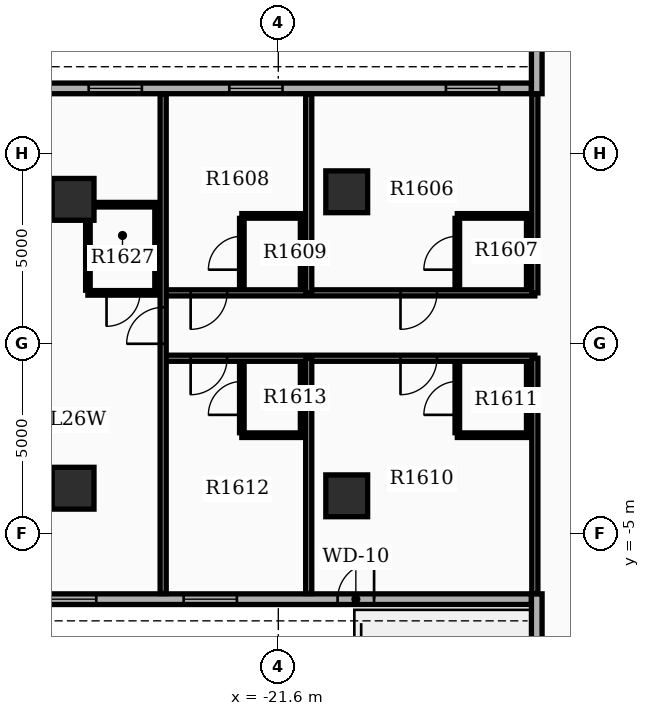
"""IFC4 building model, lengths in metres.
Left out: names, types, materials, properties, quantities, classifications, styles, units other than length and angle.
Written with IfcOpenShell. Run it as: python <this file> out.ifc"""

import sys

from ifc_helpers import new_model, si_unit, direction, frame, frame_2d, origin, origin_2d, place, context, subcontext, project, spatial, rectangle, extrude, element, fill, save


model = new_model("IFC4")
c1 = context("Model", 3, precision=1e-05, world=origin(), true_north=direction((0.0, 1.0)))
c2 = subcontext(c1, "Body", "Model", "MODEL_VIEW")
j1 = project(units=[si_unit("LENGTHUNIT", "METRE"), si_unit("PLANEANGLEUNIT", "RADIAN")], contexts=[c1])
p1 = place(None, origin())
s1 = spatial("IfcSite", under=j1, at=p1, CompositionType="ELEMENT")
p2 = place(p1, origin())
s2 = spatial("IfcBuilding", under=s1, at=p2, CompositionType="ELEMENT")
p3 = place(p2, frame((0.0, 0.0, 104.7)))
s3 = spatial("IfcBuildingStorey", under=s2, at=p3, CompositionType="ELEMENT", Elevation=104.7)
for number, where, z_axis, x_axis in (
    (1, (-19.8, -4.0, 0.0), (0.0, 0.0, 1.0), (1.0, 0.0, 0.0)),
    (2, (-19.8, 4.0, 0.0), (0.0, 0.0, 1.0), (1.0, 0.0, 0.0)),
    (3, (-27.0, -3.8, 0.0), (0.0, 0.0, 1.0), (1.0, 0.0, 0.0)),
    (4, (-27.0, 3.8, 0.0), (0.0, 0.0, 1.0), (1.0, 0.0, 0.0)),
):
    element("IfcColumn", number, at=place(p3, frame(where, z_axis=z_axis, x_axis=x_axis)), inside=s3, PredefinedType="COLUMN", context=c2, shape_type="SweptSolid", body=[
        extrude(rectangle(XDim=1.1, YDim=1.1, at=origin_2d()), origin(), (0.0, 0.0, 1.0), 3.9),
    ])
p4 = place(p3, frame((-14.94, 6.72, 0.0), z_axis=(0.0, 0.0, 1.0), x_axis=(-1.0, 0.0, 0.0)))
e5 = element("IfcWall", 5, at=p4, inside=s3, PredefinedType="STANDARD", context=c2, shape_type="SweptSolid", body=[
    extrude(rectangle(XDim=20.1, YDim=0.28, at=frame_2d((10.05, 0.0))), origin(), (0.0, 0.0, 1.0), 2.97),
])
p5 = place(p4, frame((0.85, 0.0, 0.8)))
e6 = element("IfcOpeningElement", 6, at=p5, cuts=e5, PredefinedType="OPENING", context=c2, shape_type="SweptSolid", body=[
    extrude(rectangle(XDim=1.4, YDim=1.6, at=frame_2d((0.7, 0.8))), frame((0.0, 0.15, 0.0), z_axis=(0.0, -1.0, 0.0), x_axis=(1.0, 0.0, 0.0)), (0.0, 0.0, 1.0), 0.3),
])
p6 = place(p4, frame((6.55, 0.0, 0.8)))
e7 = element("IfcOpeningElement", 7, at=p6, cuts=e5, PredefinedType="OPENING", context=c2, shape_type="SweptSolid", body=[
    extrude(rectangle(XDim=1.4, YDim=1.6, at=frame_2d((0.7, 0.8))), frame((0.0, 0.15, 0.0), z_axis=(0.0, -1.0, 0.0), x_axis=(1.0, 0.0, 0.0)), (0.0, 0.0, 1.0), 0.3),
])
p7 = place(p4, frame((10.25, 0.0, 0.8)))
e8 = element("IfcOpeningElement", 8, at=p7, cuts=e5, PredefinedType="OPENING", context=c2, shape_type="SweptSolid", body=[
    extrude(rectangle(XDim=1.4, YDim=1.6, at=frame_2d((0.7, 0.8))), frame((0.0, 0.15, 0.0), z_axis=(0.0, -1.0, 0.0), x_axis=(1.0, 0.0, 0.0)), (0.0, 0.0, 1.0), 0.3),
])
p8 = place(p4, frame((13.45, 0.0, 0.8)))
e9 = element("IfcOpeningElement", 9, at=p8, cuts=e5, PredefinedType="OPENING", context=c2, shape_type="SweptSolid", body=[
    extrude(rectangle(XDim=1.4, YDim=1.6, at=frame_2d((0.7, 0.8))), frame((0.0, 0.15, 0.0), z_axis=(0.0, -1.0, 0.0), x_axis=(1.0, 0.0, 0.0)), (0.0, 0.0, 1.0), 0.3),
])
p9 = place(p3, frame((-35.04, -6.72, 0.0), z_axis=(0.0, 0.0, 1.0), x_axis=(1.0, 0.0, 0.0)))
e10 = element("IfcWall", 10, at=p9, inside=s3, PredefinedType="STANDARD", context=c2, shape_type="SweptSolid", body=[
    extrude(rectangle(XDim=20.1, YDim=0.28, at=frame_2d((10.05, 0.0))), origin(), (0.0, 0.0, 1.0), 2.97),
])
p10 = place(p9, frame((0.85, 0.0, 0.8)))
e11 = element("IfcOpeningElement", 11, at=p10, cuts=e10, PredefinedType="OPENING", context=c2, shape_type="SweptSolid", body=[
    extrude(rectangle(XDim=1.4, YDim=1.6, at=frame_2d((0.7, 0.8))), frame((0.0, 0.15, 0.0), z_axis=(0.0, -1.0, 0.0), x_axis=(1.0, 0.0, 0.0)), (0.0, 0.0, 1.0), 0.3),
])
p11 = place(p9, frame((4.05, 0.0, 0.8)))
e12 = element("IfcOpeningElement", 12, at=p11, cuts=e10, PredefinedType="OPENING", context=c2, shape_type="SweptSolid", body=[
    extrude(rectangle(XDim=1.4, YDim=1.6, at=frame_2d((0.7, 0.8))), frame((0.0, 0.15, 0.0), z_axis=(0.0, -1.0, 0.0), x_axis=(1.0, 0.0, 0.0)), (0.0, 0.0, 1.0), 0.3),
])
p12 = place(p9, frame((7.25, 0.0, 0.8)))
e13 = element("IfcOpeningElement", 13, at=p12, cuts=e10, PredefinedType="OPENING", context=c2, shape_type="SweptSolid", body=[
    extrude(rectangle(XDim=1.4, YDim=1.6, at=frame_2d((0.7, 0.8))), frame((0.0, 0.15, 0.0), z_axis=(0.0, -1.0, 0.0), x_axis=(1.0, 0.0, 0.0)), (0.0, 0.0, 1.0), 0.3),
])
p13 = place(p9, frame((10.95, 0.0, 0.8)))
e14 = element("IfcOpeningElement", 14, at=p13, cuts=e10, PredefinedType="OPENING", context=c2, shape_type="SweptSolid", body=[
    extrude(rectangle(XDim=1.4, YDim=1.6, at=frame_2d((0.7, 0.8))), frame((0.0, 0.15, 0.0), z_axis=(0.0, -1.0, 0.0), x_axis=(1.0, 0.0, 0.0)), (0.0, 0.0, 1.0), 0.3),
])
p14 = place(p9, frame((15.0, 0.0, 0.0)))
e15 = element("IfcOpeningElement", 15, at=p14, cuts=e10, PredefinedType="OPENING", context=c2, shape_type="SweptSolid", body=[
    extrude(rectangle(XDim=0.96, YDim=2.1, at=frame_2d((0.48, 1.05))), frame((0.0, 0.15, 0.0), z_axis=(0.0, -1.0, 0.0), x_axis=(1.0, 0.0, 0.0)), (0.0, 0.0, 1.0), 0.3),
])
for number, where, z_axis, x_axis in (
    (16, (-14.8, 6.58, 0.0), (0.0, 0.0, 1.0), (0.0, 1.0, 0.0)),
    (17, (-14.8, -6.58, 0.0), (0.0, 0.0, 1.0), (0.0, -1.0, 0.0)),
):
    element("IfcWall", number, at=place(p3, frame(where, z_axis=z_axis, x_axis=x_axis)), inside=s3, PredefinedType="STANDARD", context=c2, shape_type="SweptSolid", body=[
        extrude(rectangle(XDim=6.86, YDim=0.28, at=frame_2d((3.43, 0.0))), origin(), (0.0, 0.0, 1.0), 2.97),
    ])
p15 = place(p3, frame((-14.85, 1.34, 0.0), z_axis=(0.0, 0.0, 1.0), x_axis=(-1.0, 0.0, 0.0)))
e18 = element("IfcWall", 18, at=p15, inside=s3, PredefinedType="PARTITIONING", context=c2, shape_type="SweptSolid", body=[
    extrude(rectangle(XDim=9.7, YDim=0.16, at=frame_2d((4.85, 0.0))), origin(), (0.0, 0.0, 1.0), 2.96),
])
p16 = place(p15, frame((2.575, 0.0, 0.0)))
e19 = element("IfcOpeningElement", 19, at=p16, cuts=e18, PredefinedType="OPENING", context=c2, shape_type="SweptSolid", body=[
    extrude(rectangle(XDim=0.96, YDim=2.15, at=frame_2d((0.48, 1.075))), frame((0.0, 0.09, 0.0), z_axis=(0.0, -1.0, 0.0), x_axis=(1.0, 0.0, 0.0)), (0.0, 0.0, 1.0), 0.18),
])
p17 = place(p15, frame((8.097, 0.0, 0.0)))
e20 = element("IfcOpeningElement", 20, at=p17, cuts=e18, PredefinedType="OPENING", context=c2, shape_type="SweptSolid", body=[
    extrude(rectangle(XDim=0.96, YDim=2.15, at=frame_2d((0.48, 1.075))), frame((0.0, 0.09, 0.0), z_axis=(0.0, -1.0, 0.0), x_axis=(1.0, 0.0, 0.0)), (0.0, 0.0, 1.0), 0.18),
])
for number, where, z_axis, x_axis in (
    (21, (-14.85, 1.34, 0.0), (0.0, 0.0, 1.0), (0.0, 1.0, 0.0)),
    (22, (-20.8, 1.34, 0.0), (0.0, 0.0, 1.0), (0.0, 1.0, 0.0)),
):
    element("IfcWall", number, at=place(p3, frame(where, z_axis=z_axis, x_axis=x_axis)), inside=s3, PredefinedType="PARTITIONING", context=c2, shape_type="SweptSolid", body=[
        extrude(rectangle(XDim=5.232, YDim=0.16, at=frame_2d((2.616, 0.0))), origin(), (0.0, 0.0, 1.0), 2.96),
    ])
p18 = place(p3, frame((-16.89, 1.48, 0.0), z_axis=(0.0, 0.0, 1.0), x_axis=(0.0, 1.0, 0.0)))
e23 = element("IfcWall", 23, at=p18, inside=s3, PredefinedType="PARTITIONING", context=c2, shape_type="SweptSolid", body=[
    extrude(rectangle(XDim=1.82, YDim=0.12, at=frame_2d((0.91, 0.0))), origin(), (0.0, 0.0, 1.0), 2.96),
])
p19 = place(p18, frame((0.47, 0.0, 0.0)))
e24 = element("IfcOpeningElement", 24, at=p19, cuts=e23, PredefinedType="OPENING", context=c2, shape_type="SweptSolid", body=[
    extrude(rectangle(XDim=0.88, YDim=2.1, at=frame_2d((0.44, 1.05))), frame((0.0, 0.07, 0.0), z_axis=(0.0, -1.0, 0.0), x_axis=(1.0, 0.0, 0.0)), (0.0, 0.0, 1.0), 0.14),
])
p20 = place(p3, frame((-15.01, 1.48, 0.0), z_axis=(0.0, 0.0, 1.0), x_axis=(0.0, 1.0, 0.0)))
e25 = element("IfcWall", 25, at=p20, inside=s3, PredefinedType="PARTITIONING", context=c2, shape_type="SweptSolid", body=[
    extrude(rectangle(XDim=1.82, YDim=0.12, at=frame_2d((0.91, 0.0))), origin(), (0.0, 0.0, 1.0), 2.96),
])
p21 = place(p3, frame((-15.01, 3.365, 0.0), z_axis=(0.0, 0.0, 1.0), x_axis=(-1.0, 0.0, 0.0)))
e26 = element("IfcWall", 26, at=p21, inside=s3, PredefinedType="PARTITIONING", context=c2, shape_type="SweptSolid", body=[
    extrude(rectangle(XDim=1.88, YDim=0.12, at=frame_2d((0.94, 0.0))), origin(), (0.0, 0.0, 1.0), 2.96),
])
p22 = place(p3, frame((-22.56, 1.48, 0.0), z_axis=(0.0, 0.0, 1.0), x_axis=(0.0, 1.0, 0.0)))
e27 = element("IfcWall", 27, at=p22, inside=s3, PredefinedType="PARTITIONING", context=c2, shape_type="SweptSolid", body=[
    extrude(rectangle(XDim=1.82, YDim=0.12, at=frame_2d((0.91, 0.0))), origin(), (0.0, 0.0, 1.0), 2.96),
])
p23 = place(p22, frame((0.47, 0.0, 0.0)))
e28 = element("IfcOpeningElement", 28, at=p23, cuts=e27, PredefinedType="OPENING", context=c2, shape_type="SweptSolid", body=[
    extrude(rectangle(XDim=0.88, YDim=2.1, at=frame_2d((0.44, 1.05))), frame((0.0, 0.07, 0.0), z_axis=(0.0, -1.0, 0.0), x_axis=(1.0, 0.0, 0.0)), (0.0, 0.0, 1.0), 0.14),
])
p24 = place(p3, frame((-20.96, 1.48, 0.0), z_axis=(0.0, 0.0, 1.0), x_axis=(0.0, 1.0, 0.0)))
e29 = element("IfcWall", 29, at=p24, inside=s3, PredefinedType="PARTITIONING", context=c2, shape_type="SweptSolid", body=[
    extrude(rectangle(XDim=1.82, YDim=0.12, at=frame_2d((0.91, 0.0))), origin(), (0.0, 0.0, 1.0), 2.96),
])
p25 = place(p3, frame((-20.96, 3.365, 0.0), z_axis=(0.0, 0.0, 1.0), x_axis=(-1.0, 0.0, 0.0)))
e30 = element("IfcWall", 30, at=p25, inside=s3, PredefinedType="PARTITIONING", context=c2, shape_type="SweptSolid", body=[
    extrude(rectangle(XDim=1.6, YDim=0.12, at=frame_2d((0.8, 0.0))), origin(), (0.0, 0.0, 1.0), 2.96),
])
p26 = place(p3, frame((-14.85, -0.38, 0.0), z_axis=(0.0, 0.0, 1.0), x_axis=(-1.0, 0.0, 0.0)))
e31 = element("IfcWall", 31, at=p26, inside=s3, PredefinedType="PARTITIONING", context=c2, shape_type="SweptSolid", body=[
    extrude(rectangle(XDim=9.7, YDim=0.16, at=frame_2d((4.85, 0.0))), origin(), (0.0, 0.0, 1.0), 2.96),
])
p27 = place(p26, frame((2.575, 0.0, 0.0)))
e32 = element("IfcOpeningElement", 32, at=p27, cuts=e31, PredefinedType="OPENING", context=c2, shape_type="SweptSolid", body=[
    extrude(rectangle(XDim=0.96, YDim=2.15, at=frame_2d((0.48, 1.075))), frame((0.0, 0.09, 0.0), z_axis=(0.0, -1.0, 0.0), x_axis=(1.0, 0.0, 0.0)), (0.0, 0.0, 1.0), 0.18),
])
p28 = place(p26, frame((8.097, 0.0, 0.0)))
e33 = element("IfcOpeningElement", 33, at=p28, cuts=e31, PredefinedType="OPENING", context=c2, shape_type="SweptSolid", body=[
    extrude(rectangle(XDim=0.96, YDim=2.15, at=frame_2d((0.48, 1.075))), frame((0.0, 0.09, 0.0), z_axis=(0.0, -1.0, 0.0), x_axis=(1.0, 0.0, 0.0)), (0.0, 0.0, 1.0), 0.18),
])
for number, where, z_axis, x_axis in (
    (34, (-14.85, -0.38, 0.0), (0.0, 0.0, 1.0), (0.0, -1.0, 0.0)),
    (35, (-20.8, -0.38, 0.0), (0.0, 0.0, 1.0), (0.0, -1.0, 0.0)),
):
    element("IfcWall", number, at=place(p3, frame(where, z_axis=z_axis, x_axis=x_axis)), inside=s3, PredefinedType="PARTITIONING", context=c2, shape_type="SweptSolid", body=[
        extrude(rectangle(XDim=6.192, YDim=0.16, at=frame_2d((3.096, 0.0))), origin(), (0.0, 0.0, 1.0), 2.96),
    ])
p29 = place(p3, frame((-16.89, -2.34, 0.0), z_axis=(0.0, 0.0, 1.0), x_axis=(0.0, 1.0, 0.0)))
e36 = element("IfcWall", 36, at=p29, inside=s3, PredefinedType="PARTITIONING", context=c2, shape_type="SweptSolid", body=[
    extrude(rectangle(XDim=1.82, YDim=0.12, at=frame_2d((0.91, 0.0))), origin(), (0.0, 0.0, 1.0), 2.96),
])
p30 = place(p29, frame((0.47, 0.0, 0.0)))
e37 = element("IfcOpeningElement", 37, at=p30, cuts=e36, PredefinedType="OPENING", context=c2, shape_type="SweptSolid", body=[
    extrude(rectangle(XDim=0.88, YDim=2.1, at=frame_2d((0.44, 1.05))), frame((0.0, 0.07, 0.0), z_axis=(0.0, -1.0, 0.0), x_axis=(1.0, 0.0, 0.0)), (0.0, 0.0, 1.0), 0.14),
])
p31 = place(p3, frame((-15.01, -2.34, 0.0), z_axis=(0.0, 0.0, 1.0), x_axis=(0.0, 1.0, 0.0)))
e38 = element("IfcWall", 38, at=p31, inside=s3, PredefinedType="PARTITIONING", context=c2, shape_type="SweptSolid", body=[
    extrude(rectangle(XDim=1.82, YDim=0.12, at=frame_2d((0.91, 0.0))), origin(), (0.0, 0.0, 1.0), 2.96),
])
p32 = place(p3, frame((-15.01, -2.405, 0.0), z_axis=(0.0, 0.0, 1.0), x_axis=(-1.0, 0.0, 0.0)))
e39 = element("IfcWall", 39, at=p32, inside=s3, PredefinedType="PARTITIONING", context=c2, shape_type="SweptSolid", body=[
    extrude(rectangle(XDim=1.88, YDim=0.12, at=frame_2d((0.94, 0.0))), origin(), (0.0, 0.0, 1.0), 2.96),
])
p33 = place(p3, frame((-22.56, -2.34, 0.0), z_axis=(0.0, 0.0, 1.0), x_axis=(0.0, 1.0, 0.0)))
e40 = element("IfcWall", 40, at=p33, inside=s3, PredefinedType="PARTITIONING", context=c2, shape_type="SweptSolid", body=[
    extrude(rectangle(XDim=1.82, YDim=0.12, at=frame_2d((0.91, 0.0))), origin(), (0.0, 0.0, 1.0), 2.96),
])
p34 = place(p33, frame((0.47, 0.0, 0.0)))
e41 = element("IfcOpeningElement", 41, at=p34, cuts=e40, PredefinedType="OPENING", context=c2, shape_type="SweptSolid", body=[
    extrude(rectangle(XDim=0.88, YDim=2.1, at=frame_2d((0.44, 1.05))), frame((0.0, 0.07, 0.0), z_axis=(0.0, -1.0, 0.0), x_axis=(1.0, 0.0, 0.0)), (0.0, 0.0, 1.0), 0.14),
])
p35 = place(p3, frame((-20.96, -2.34, 0.0), z_axis=(0.0, 0.0, 1.0), x_axis=(0.0, 1.0, 0.0)))
e42 = element("IfcWall", 42, at=p35, inside=s3, PredefinedType="PARTITIONING", context=c2, shape_type="SweptSolid", body=[
    extrude(rectangle(XDim=1.82, YDim=0.12, at=frame_2d((0.91, 0.0))), origin(), (0.0, 0.0, 1.0), 2.96),
])
p36 = place(p3, frame((-20.96, -2.405, 0.0), z_axis=(0.0, 0.0, 1.0), x_axis=(-1.0, 0.0, 0.0)))
e43 = element("IfcWall", 43, at=p36, inside=s3, PredefinedType="PARTITIONING", context=c2, shape_type="SweptSolid", body=[
    extrude(rectangle(XDim=1.6, YDim=0.12, at=frame_2d((0.8, 0.0))), origin(), (0.0, 0.0, 1.0), 2.96),
])
p37 = place(p3, frame((-24.63, -6.572, 0.0), z_axis=(0.0, 0.0, 1.0), x_axis=(0.0, 1.0, 0.0)))
e44 = element("IfcWall", 44, at=p37, inside=s3, PredefinedType="PARTITIONING", context=c2, shape_type="SweptSolid", body=[
    extrude(rectangle(XDim=13.144, YDim=0.16, at=frame_2d((6.572, 0.0))), origin(), (0.0, 0.0, 1.0), 2.96),
])
p38 = place(p37, frame((6.572, 0.0, 0.0)))
e45 = element("IfcOpeningElement", 45, at=p38, cuts=e44, PredefinedType="OPENING", context=c2, shape_type="SweptSolid", body=[
    extrude(rectangle(XDim=0.96, YDim=2.15, at=frame_2d((0.48, 1.075))), frame((0.0, 0.09, 0.0), z_axis=(0.0, -1.0, 0.0), x_axis=(1.0, 0.0, 0.0)), (0.0, 0.0, 1.0), 0.18),
])
for number, where, z_axis, x_axis in (
    (46, (-24.79, 1.41, 0.0), (0.0, 0.0, 1.0), (0.0, 1.0, 0.0)),
    (47, (-26.61, 1.41, 0.0), (0.0, 0.0, 1.0), (0.0, 1.0, 0.0)),
):
    element("IfcWall", number, at=place(p3, frame(where, z_axis=z_axis, x_axis=x_axis)), inside=s3, PredefinedType="PARTITIONING", context=c2, shape_type="SweptSolid", body=[
        extrude(rectangle(XDim=2.18, YDim=0.12, at=frame_2d((1.09, 0.0))), origin(), (0.0, 0.0, 1.0), 2.96),
    ])
p39 = place(p3, frame((-24.79, 1.34, 0.0), z_axis=(0.0, 0.0, 1.0), x_axis=(-1.0, 0.0, 0.0)))
e48 = element("IfcWall", 48, at=p39, inside=s3, PredefinedType="PARTITIONING", context=c2, shape_type="SweptSolid", body=[
    extrude(rectangle(XDim=1.82, YDim=0.12, at=frame_2d((0.91, 0.0))), origin(), (0.0, 0.0, 1.0), 2.96),
])
p40 = place(p39, frame((0.45, 0.0, 0.0)))
e49 = element("IfcOpeningElement", 49, at=p40, cuts=e48, PredefinedType="OPENING", context=c2, shape_type="SweptSolid", body=[
    extrude(rectangle(XDim=0.88, YDim=2.1, at=frame_2d((0.44, 1.05))), frame((0.0, 0.07, 0.0), z_axis=(0.0, -1.0, 0.0), x_axis=(1.0, 0.0, 0.0)), (0.0, 0.0, 1.0), 0.14),
])
p41 = place(p3, frame((-24.79, 3.66, 0.0), z_axis=(0.0, 0.0, 1.0), x_axis=(-1.0, 0.0, 0.0)))
e50 = element("IfcWall", 50, at=p41, inside=s3, PredefinedType="PARTITIONING", context=c2, shape_type="SweptSolid", body=[
    extrude(rectangle(XDim=1.82, YDim=0.12, at=frame_2d((0.91, 0.0))), origin(), (0.0, 0.0, 1.0), 2.96),
])
p42 = place(p5, origin())
e51 = element("IfcWindow", 51, at=p42, inside=s3, PartitioningType="SINGLE_PANEL", PredefinedType="WINDOW", context=c2, shape_type="SweptSolid", body=[
    extrude(rectangle(XDim=1.4, YDim=1.6, at=frame_2d((0.7, 0.8))), frame((0.0, 0.03, 0.0), z_axis=(0.0, -1.0, 0.0), x_axis=(1.0, 0.0, 0.0)), (0.0, 0.0, 1.0), 0.06),
])
fill(e6, e51)
p43 = place(p6, origin())
e52 = element("IfcWindow", 52, at=p43, inside=s3, PartitioningType="SINGLE_PANEL", PredefinedType="WINDOW", context=c2, shape_type="SweptSolid", body=[
    extrude(rectangle(XDim=1.4, YDim=1.6, at=frame_2d((0.7, 0.8))), frame((0.0, 0.03, 0.0), z_axis=(0.0, -1.0, 0.0), x_axis=(1.0, 0.0, 0.0)), (0.0, 0.0, 1.0), 0.06),
])
fill(e7, e52)
p44 = place(p7, origin())
e53 = element("IfcWindow", 53, at=p44, inside=s3, PartitioningType="SINGLE_PANEL", PredefinedType="WINDOW", context=c2, shape_type="SweptSolid", body=[
    extrude(rectangle(XDim=1.4, YDim=1.6, at=frame_2d((0.7, 0.8))), frame((0.0, 0.03, 0.0), z_axis=(0.0, -1.0, 0.0), x_axis=(1.0, 0.0, 0.0)), (0.0, 0.0, 1.0), 0.06),
])
fill(e8, e53)
p45 = place(p12, origin())
e54 = element("IfcWindow", 54, at=p45, inside=s3, PartitioningType="SINGLE_PANEL", PredefinedType="WINDOW", context=c2, shape_type="SweptSolid", body=[
    extrude(rectangle(XDim=1.4, YDim=1.6, at=frame_2d((0.7, 0.8))), frame((0.0, 0.03, 0.0), z_axis=(0.0, -1.0, 0.0), x_axis=(1.0, 0.0, 0.0)), (0.0, 0.0, 1.0), 0.06),
])
fill(e13, e54)
p46 = place(p13, origin())
e55 = element("IfcWindow", 55, at=p46, inside=s3, PartitioningType="SINGLE_PANEL", PredefinedType="WINDOW", context=c2, shape_type="SweptSolid", body=[
    extrude(rectangle(XDim=1.4, YDim=1.6, at=frame_2d((0.7, 0.8))), frame((0.0, 0.03, 0.0), z_axis=(0.0, -1.0, 0.0), x_axis=(1.0, 0.0, 0.0)), (0.0, 0.0, 1.0), 0.06),
])
fill(e14, e55)
p47 = place(p14, origin())
e56 = element("IfcDoor", 56, at=p47, inside=s3, OperationType="SINGLE_SWING_RIGHT", PredefinedType="DOOR", context=c2, shape_type="SweptSolid", body=[
    extrude(rectangle(XDim=0.96, YDim=2.1, at=frame_2d((0.48, 1.05))), frame((0.0, 0.025, 0.0), z_axis=(0.0, -1.0, 0.0), x_axis=(1.0, 0.0, 0.0)), (0.0, 0.0, 1.0), 0.05),
])
fill(e15, e56)
p48 = place(p16, origin())
e57 = element("IfcDoor", 57, at=p48, inside=s3, OperationType="SINGLE_SWING_RIGHT", PredefinedType="DOOR", context=c2, shape_type="SweptSolid", body=[
    extrude(rectangle(XDim=0.96, YDim=2.15, at=frame_2d((0.48, 1.075))), frame((0.0, 0.025, 0.0), z_axis=(0.0, -1.0, 0.0), x_axis=(1.0, 0.0, 0.0)), (0.0, 0.0, 1.0), 0.05),
])
fill(e19, e57)
p49 = place(p19, origin())
e58 = element("IfcDoor", 58, at=p49, inside=s3, OperationType="SINGLE_SWING_LEFT", PredefinedType="DOOR", context=c2, shape_type="SweptSolid", body=[
    extrude(rectangle(XDim=0.88, YDim=2.1, at=frame_2d((0.44, 1.05))), frame((0.0, 0.025, 0.0), z_axis=(0.0, -1.0, 0.0), x_axis=(1.0, 0.0, 0.0)), (0.0, 0.0, 1.0), 0.05),
])
fill(e24, e58)
p50 = place(p17, origin())
e59 = element("IfcDoor", 59, at=p50, inside=s3, OperationType="SINGLE_SWING_RIGHT", PredefinedType="DOOR", context=c2, shape_type="SweptSolid", body=[
    extrude(rectangle(XDim=0.96, YDim=2.15, at=frame_2d((0.48, 1.075))), frame((0.0, 0.025, 0.0), z_axis=(0.0, -1.0, 0.0), x_axis=(1.0, 0.0, 0.0)), (0.0, 0.0, 1.0), 0.05),
])
fill(e20, e59)
p51 = place(p23, origin())
e60 = element("IfcDoor", 60, at=p51, inside=s3, OperationType="SINGLE_SWING_LEFT", PredefinedType="DOOR", context=c2, shape_type="SweptSolid", body=[
    extrude(rectangle(XDim=0.88, YDim=2.1, at=frame_2d((0.44, 1.05))), frame((0.0, 0.025, 0.0), z_axis=(0.0, -1.0, 0.0), x_axis=(1.0, 0.0, 0.0)), (0.0, 0.0, 1.0), 0.05),
])
fill(e28, e60)
p52 = place(p27, origin())
e61 = element("IfcDoor", 61, at=p52, inside=s3, OperationType="SINGLE_SWING_RIGHT", PredefinedType="DOOR", context=c2, shape_type="SweptSolid", body=[
    extrude(rectangle(XDim=0.96, YDim=2.15, at=frame_2d((0.48, 1.075))), frame((0.0, 0.025, 0.0), z_axis=(0.0, -1.0, 0.0), x_axis=(1.0, 0.0, 0.0)), (0.0, 0.0, 1.0), 0.05),
])
fill(e32, e61)
p53 = place(p30, origin())
e62 = element("IfcDoor", 62, at=p53, inside=s3, OperationType="SINGLE_SWING_LEFT", PredefinedType="DOOR", context=c2, shape_type="SweptSolid", body=[
    extrude(rectangle(XDim=0.88, YDim=2.1, at=frame_2d((0.44, 1.05))), frame((0.0, 0.025, 0.0), z_axis=(0.0, -1.0, 0.0), x_axis=(1.0, 0.0, 0.0)), (0.0, 0.0, 1.0), 0.05),
])
fill(e37, e62)
p54 = place(p28, origin())
e63 = element("IfcDoor", 63, at=p54, inside=s3, OperationType="SINGLE_SWING_RIGHT", PredefinedType="DOOR", context=c2, shape_type="SweptSolid", body=[
    extrude(rectangle(XDim=0.96, YDim=2.15, at=frame_2d((0.48, 1.075))), frame((0.0, 0.025, 0.0), z_axis=(0.0, -1.0, 0.0), x_axis=(1.0, 0.0, 0.0)), (0.0, 0.0, 1.0), 0.05),
])
fill(e33, e63)
p55 = place(p34, origin())
e64 = element("IfcDoor", 64, at=p55, inside=s3, OperationType="SINGLE_SWING_LEFT", PredefinedType="DOOR", context=c2, shape_type="SweptSolid", body=[
    extrude(rectangle(XDim=0.88, YDim=2.1, at=frame_2d((0.44, 1.05))), frame((0.0, 0.025, 0.0), z_axis=(0.0, -1.0, 0.0), x_axis=(1.0, 0.0, 0.0)), (0.0, 0.0, 1.0), 0.05),
])
fill(e41, e64)
p56 = place(p38, origin())
e65 = element("IfcDoor", 65, at=p56, inside=s3, OperationType="SINGLE_SWING_LEFT", PredefinedType="DOOR", context=c2, shape_type="SweptSolid", body=[
    extrude(rectangle(XDim=0.96, YDim=2.15, at=frame_2d((0.48, 1.075))), frame((0.0, 0.025, 0.0), z_axis=(0.0, -1.0, 0.0), x_axis=(1.0, 0.0, 0.0)), (0.0, 0.0, 1.0), 0.05),
])
fill(e45, e65)
p57 = place(p40, origin())
e66 = element("IfcDoor", 66, at=p57, inside=s3, OperationType="SINGLE_SWING_RIGHT", PredefinedType="DOOR", context=c2, shape_type="SweptSolid", body=[
    extrude(rectangle(XDim=0.88, YDim=2.1, at=frame_2d((0.44, 1.05))), frame((0.0, 0.025, 0.0), z_axis=(0.0, -1.0, 0.0), x_axis=(1.0, 0.0, 0.0)), (0.0, 0.0, 1.0), 0.05),
])
fill(e49, e66)
save(model, sys.argv[1])
